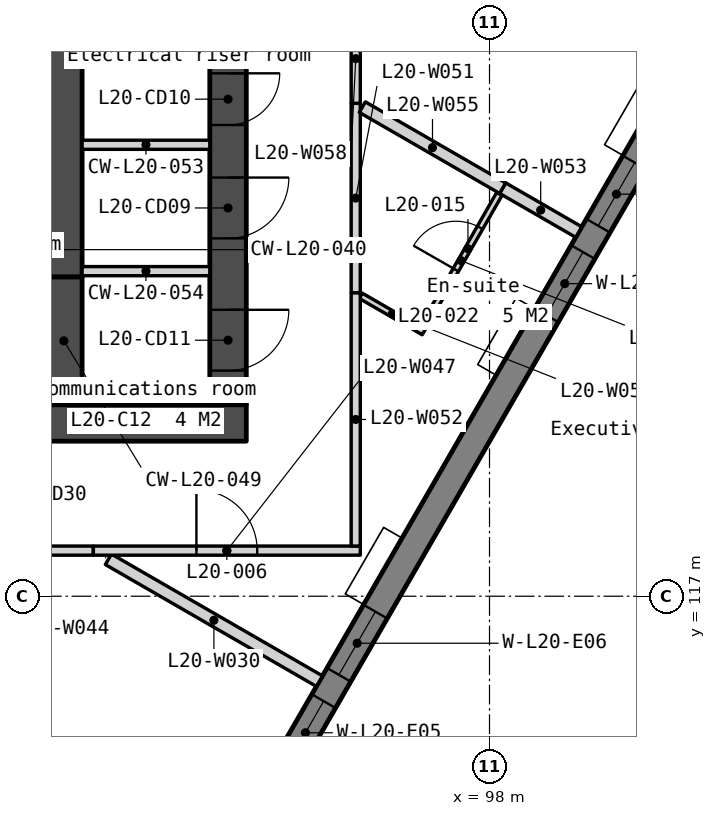
"""IFC4 building model, lengths in metres.
Left out: names, types, materials, properties, quantities, classifications, styles, units other than length and angle.
Written with IfcOpenShell. Run it as: python <this file> out.ifc"""

import sys

from ifc_helpers import new_model, si_unit, direction, frame, frame_2d, origin, place, context, subcontext, project, spatial, polyline, rectangle, outline, extrude, element, fill, save


model = new_model("IFC4")
c1 = context("Model", 3, precision=1e-05, world=origin(), true_north=direction((0.0, 1.0)))
c2 = subcontext(c1, "Body", "Model", "MODEL_VIEW")
j1 = project(units=[si_unit("LENGTHUNIT", "METRE"), si_unit("PLANEANGLEUNIT", "RADIAN")], contexts=[c1])
p1 = place(None, origin())
s1 = spatial("IfcSite", under=j1, at=p1, CompositionType="ELEMENT")
p2 = place(p1, origin())
s2 = spatial("IfcBuilding", under=s1, at=p2, CompositionType="ELEMENT")
p3 = place(p2, frame((0.0, 0.0, 85.3)))
s3 = spatial("IfcBuildingStorey", under=s2, at=p3, CompositionType="ELEMENT", Elevation=85.3)
p4 = place(p3, frame((66.0, 119.85, 0.0), z_axis=(0.0, 0.0, 1.0), x_axis=(1.0, 0.0, 0.0)))
e1 = element("IfcWall", 1, at=p4, inside=s3, PredefinedType="SOLIDWALL", context=c2, shape_type="SweptSolid", body=[
    extrude(rectangle(XDim=28.0, YDim=0.6, at=frame_2d((14.0, 0.0))), origin(), (0.0, 0.0, 1.0), 3.35),
])
p5 = place(p4, frame((6.825, 0.0, 0.0)))
e2 = element("IfcOpeningElement", 2, at=p5, cuts=e1, PredefinedType="OPENING", context=c2, shape_type="SweptSolid", body=[
    extrude(rectangle(XDim=1.8, YDim=2.1, at=frame_2d((0.9, 1.05))), frame((0.0, 0.31, 0.0), z_axis=(0.0, -1.0, 0.0), x_axis=(1.0, 0.0, 0.0)), (0.0, 0.0, 1.0), 0.62),
])
p6 = place(p4, frame((15.85, 0.0, 0.0)))
e3 = element("IfcOpeningElement", 3, at=p6, cuts=e1, PredefinedType="OPENING", context=c2, shape_type="SweptSolid", body=[
    extrude(rectangle(XDim=1.5, YDim=2.1, at=frame_2d((0.75, 1.05))), frame((0.0, 0.31, 0.0), z_axis=(0.0, -1.0, 0.0), x_axis=(1.0, 0.0, 0.0)), (0.0, 0.0, 1.0), 0.62),
])
p7 = place(p4, frame((19.375, 0.0, 0.0)))
e4 = element("IfcOpeningElement", 4, at=p7, cuts=e1, PredefinedType="OPENING", context=c2, shape_type="SweptSolid", body=[
    extrude(rectangle(XDim=1.8, YDim=2.1, at=frame_2d((0.9, 1.05))), frame((0.0, 0.31, 0.0), z_axis=(0.0, -1.0, 0.0), x_axis=(1.0, 0.0, 0.0)), (0.0, 0.0, 1.0), 0.62),
])
p8 = place(p4, frame((4.425, 0.0, 0.0)))
e5 = element("IfcOpeningElement", 5, at=p8, cuts=e1, PredefinedType="OPENING", context=c2, shape_type="SweptSolid", body=[
    extrude(rectangle(XDim=1.0, YDim=2.1, at=frame_2d((0.5, 1.05))), frame((0.0, 0.31, 0.0), z_axis=(0.0, -1.0, 0.0), x_axis=(1.0, 0.0, 0.0)), (0.0, 0.0, 1.0), 0.62),
])
p9 = place(p4, frame((9.783, 0.0, 0.0)))
e6 = element("IfcOpeningElement", 6, at=p9, cuts=e1, PredefinedType="OPENING", context=c2, shape_type="SweptSolid", body=[
    extrude(rectangle(XDim=1.0, YDim=2.1, at=frame_2d((0.5, 1.05))), frame((0.0, 0.31, 0.0), z_axis=(0.0, -1.0, 0.0), x_axis=(1.0, 0.0, 0.0)), (0.0, 0.0, 1.0), 0.62),
])
p10 = place(p4, frame((11.525, 0.0, 0.0)))
e7 = element("IfcOpeningElement", 7, at=p10, cuts=e1, PredefinedType="OPENING", context=c2, shape_type="SweptSolid", body=[
    extrude(rectangle(XDim=1.0, YDim=2.1, at=frame_2d((0.5, 1.05))), frame((0.0, 0.31, 0.0), z_axis=(0.0, -1.0, 0.0), x_axis=(1.0, 0.0, 0.0)), (0.0, 0.0, 1.0), 0.62),
])
p11 = place(p4, frame((13.658, 0.0, 0.0)))
e8 = element("IfcOpeningElement", 8, at=p11, cuts=e1, PredefinedType="OPENING", context=c2, shape_type="SweptSolid", body=[
    extrude(rectangle(XDim=1.0, YDim=2.1, at=frame_2d((0.5, 1.05))), frame((0.0, 0.31, 0.0), z_axis=(0.0, -1.0, 0.0), x_axis=(1.0, 0.0, 0.0)), (0.0, 0.0, 1.0), 0.62),
])
p12 = place(p4, frame((21.725, 0.0, 0.0)))
e9 = element("IfcOpeningElement", 9, at=p12, cuts=e1, PredefinedType="OPENING", context=c2, shape_type="SweptSolid", body=[
    extrude(rectangle(XDim=1.0, YDim=2.1, at=frame_2d((0.5, 1.05))), frame((0.0, 0.31, 0.0), z_axis=(0.0, -1.0, 0.0), x_axis=(1.0, 0.0, 0.0)), (0.0, 0.0, 1.0), 0.62),
])
p13 = place(p4, frame((23.425, 0.0, 0.0)))
e10 = element("IfcOpeningElement", 10, at=p13, cuts=e1, PredefinedType="OPENING", context=c2, shape_type="SweptSolid", body=[
    extrude(rectangle(XDim=1.0, YDim=2.1, at=frame_2d((0.5, 1.05))), frame((0.0, 0.31, 0.0), z_axis=(0.0, -1.0, 0.0), x_axis=(1.0, 0.0, 0.0)), (0.0, 0.0, 1.0), 0.62),
])
p14 = place(p3, frame((90.85, 133.95, 0.0), z_axis=(0.0, 0.0, 1.0), x_axis=(0.0, -1.0, 0.0)))
e11 = element("IfcWall", 11, at=p14, inside=s3, PredefinedType="SOLIDWALL", context=c2, shape_type="SweptSolid", body=[
    extrude(rectangle(XDim=11.7, YDim=0.9, at=frame_2d((5.85, 0.0))), origin(), (0.0, 0.0, 1.0), 3.35),
])
p15 = place(p3, frame((91.0, 122.25, 0.0), z_axis=(0.0, 0.0, 1.0), x_axis=(0.0, -1.0, 0.0)))
e12 = element("IfcWall", 12, at=p15, inside=s3, PredefinedType="SOLIDWALL", context=c2, shape_type="SweptSolid", body=[
    extrude(rectangle(XDim=2.1, YDim=0.6, at=frame_2d((1.05, 0.0))), origin(), (0.0, 0.0, 1.0), 3.35),
])
p16 = place(p3, frame((91.3, 126.15, 0.0), z_axis=(0.0, 0.0, 1.0), x_axis=(1.0, 0.0, 0.0)))
e13 = element("IfcWall", 13, at=p16, inside=s3, PredefinedType="SOLIDWALL", context=c2, shape_type="SweptSolid", body=[
    extrude(rectangle(XDim=2.1, YDim=0.6, at=frame_2d((1.05, 0.0))), origin(), (0.0, 0.0, 1.0), 3.35),
])
for number, where, z_axis, x_axis in (
    (14, (91.3, 124.425, 0.0), (0.0, 0.0, 1.0), (1.0, 0.0, 0.0)),
    (15, (91.3, 122.346, 0.0), (0.0, 0.0, 1.0), (1.0, 0.0, 0.0)),
):
    element("IfcWall", number, at=place(p3, frame(where, z_axis=z_axis, x_axis=x_axis)), inside=s3, PredefinedType="PARTITIONING", context=c2, shape_type="SweptSolid", body=[
        extrude(rectangle(XDim=2.1, YDim=0.15, at=frame_2d((1.05, 0.0))), origin(), (0.0, 0.0, 1.0), 3.35),
    ])
p17 = place(p3, frame((93.7, 133.95, 0.0), z_axis=(0.0, 0.0, 1.0), x_axis=(0.0, -1.0, 0.0)))
e16 = element("IfcWall", 16, at=p17, inside=s3, PredefinedType="SOLIDWALL", context=c2, shape_type="SweptSolid", body=[
    extrude(rectangle(XDim=13.8, YDim=0.6, at=frame_2d((6.9, 0.0))), origin(), (0.0, 0.0, 1.0), 3.35),
])
p18 = place(p17, frame((0.6, 0.0, 0.0)))
e17 = element("IfcOpeningElement", 17, at=p18, cuts=e16, PredefinedType="OPENING", context=c2, shape_type="SweptSolid", body=[
    extrude(rectangle(XDim=1.1, YDim=2.1, at=frame_2d((0.55, 1.05))), frame((0.0, 0.31, 0.0), z_axis=(0.0, -1.0, 0.0), x_axis=(1.0, 0.0, 0.0)), (0.0, 0.0, 1.0), 0.62),
])
p19 = place(p17, frame((10.064, 0.0, 0.0)))
e18 = element("IfcOpeningElement", 18, at=p19, cuts=e16, PredefinedType="OPENING", context=c2, shape_type="SweptSolid", body=[
    extrude(rectangle(XDim=1.0, YDim=2.1, at=frame_2d((0.5, 1.05))), frame((0.0, 0.31, 0.0), z_axis=(0.0, -1.0, 0.0), x_axis=(1.0, 0.0, 0.0)), (0.0, 0.0, 1.0), 0.62),
])
p20 = place(p17, frame((8.35, 0.0, 0.0)))
e19 = element("IfcOpeningElement", 19, at=p20, cuts=e16, PredefinedType="OPENING", context=c2, shape_type="SweptSolid", body=[
    extrude(rectangle(XDim=0.85, YDim=2.1, at=frame_2d((0.425, 1.05))), frame((0.0, 0.31, 0.0), z_axis=(0.0, -1.0, 0.0), x_axis=(1.0, 0.0, 0.0)), (0.0, 0.0, 1.0), 0.62),
])
p21 = place(p17, frame((12.239, 0.0, 0.0)))
e20 = element("IfcOpeningElement", 20, at=p21, cuts=e16, PredefinedType="OPENING", context=c2, shape_type="SweptSolid", body=[
    extrude(rectangle(XDim=1.0, YDim=2.1, at=frame_2d((0.5, 1.05))), frame((0.0, 0.31, 0.0), z_axis=(0.0, -1.0, 0.0), x_axis=(1.0, 0.0, 0.0)), (0.0, 0.0, 1.0), 0.62),
])
p22 = place(p3, frame((82.605, 93.333, -0.15), z_axis=(0.0, 0.0, 1.0), x_axis=(0.500000478905, 0.866025127289, 0.0)))
e21 = element("IfcWall", 21, at=p22, inside=s3, PredefinedType="SOLIDWALL", context=c2, shape_type="SweptSolid", body=[
    extrude(outline(polyline([(42.643, 0.0), (42.643, 3.5), (0.0, 3.5), (0.0, 0.0), (42.643, 0.0)])), frame((0.0, 0.225, 0.0), z_axis=(0.0, -1.0, 0.0), x_axis=(1.0, 0.0, 0.0)), (0.0, 0.0, 1.0), 0.45),
])
p23 = place(p22, frame((7.079, 0.0, 1.05)))
e22 = element("IfcOpeningElement", 22, at=p23, cuts=e21, PredefinedType="OPENING", context=c2, shape_type="SweptSolid", body=[
    extrude(rectangle(XDim=1.2, YDim=1.5, at=frame_2d((0.6, 0.75))), frame((0.0, 0.235, 0.0), z_axis=(0.0, -1.0, 0.0), x_axis=(1.0, 0.0, 0.0)), (0.0, 0.0, 1.0), 0.47),
])
p24 = place(p22, frame((8.779, 0.0, 1.05)))
e23 = element("IfcOpeningElement", 23, at=p24, cuts=e21, PredefinedType="OPENING", context=c2, shape_type="SweptSolid", body=[
    extrude(rectangle(XDim=1.2, YDim=1.5, at=frame_2d((0.6, 0.75))), frame((0.0, 0.235, 0.0), z_axis=(0.0, -1.0, 0.0), x_axis=(1.0, 0.0, 0.0)), (0.0, 0.0, 1.0), 0.47),
])
p25 = place(p22, frame((15.607, 0.0, 1.05)))
e24 = element("IfcOpeningElement", 24, at=p25, cuts=e21, PredefinedType="OPENING", context=c2, shape_type="SweptSolid", body=[
    extrude(rectangle(XDim=1.2, YDim=1.5, at=frame_2d((0.6, 0.75))), frame((0.0, 0.235, 0.0), z_axis=(0.0, -1.0, 0.0), x_axis=(1.0, 0.0, 0.0)), (0.0, 0.0, 1.0), 0.47),
])
p26 = place(p22, frame((17.307, 0.0, 1.05)))
e25 = element("IfcOpeningElement", 25, at=p26, cuts=e21, PredefinedType="OPENING", context=c2, shape_type="SweptSolid", body=[
    extrude(rectangle(XDim=1.2, YDim=1.5, at=frame_2d((0.6, 0.75))), frame((0.0, 0.235, 0.0), z_axis=(0.0, -1.0, 0.0), x_axis=(1.0, 0.0, 0.0)), (0.0, 0.0, 1.0), 0.47),
])
p27 = place(p22, frame((24.136, 0.0, 1.05)))
e26 = element("IfcOpeningElement", 26, at=p27, cuts=e21, PredefinedType="OPENING", context=c2, shape_type="SweptSolid", body=[
    extrude(rectangle(XDim=1.2, YDim=1.5, at=frame_2d((0.6, 0.75))), frame((0.0, 0.235, 0.0), z_axis=(0.0, -1.0, 0.0), x_axis=(1.0, 0.0, 0.0)), (0.0, 0.0, 1.0), 0.47),
])
p28 = place(p22, frame((25.836, 0.0, 1.05)))
e27 = element("IfcOpeningElement", 27, at=p28, cuts=e21, PredefinedType="OPENING", context=c2, shape_type="SweptSolid", body=[
    extrude(rectangle(XDim=1.2, YDim=1.5, at=frame_2d((0.6, 0.75))), frame((0.0, 0.235, 0.0), z_axis=(0.0, -1.0, 0.0), x_axis=(1.0, 0.0, 0.0)), (0.0, 0.0, 1.0), 0.47),
])
p29 = place(p22, frame((32.665, 0.0, 1.05)))
e28 = element("IfcOpeningElement", 28, at=p29, cuts=e21, PredefinedType="OPENING", context=c2, shape_type="SweptSolid", body=[
    extrude(rectangle(XDim=1.2, YDim=1.5, at=frame_2d((0.6, 0.75))), frame((0.0, 0.235, 0.0), z_axis=(0.0, -1.0, 0.0), x_axis=(1.0, 0.0, 0.0)), (0.0, 0.0, 1.0), 0.47),
])
p30 = place(p22, frame((34.365, 0.0, 1.05)))
e29 = element("IfcOpeningElement", 29, at=p30, cuts=e21, PredefinedType="OPENING", context=c2, shape_type="SweptSolid", body=[
    extrude(rectangle(XDim=1.2, YDim=1.5, at=frame_2d((0.6, 0.75))), frame((0.0, 0.235, 0.0), z_axis=(0.0, -1.0, 0.0), x_axis=(1.0, 0.0, 0.0)), (0.0, 0.0, 1.0), 0.47),
])
p31 = place(p3, frame((86.087, 115.943, 0.0), z_axis=(0.0, 0.0, 1.0), x_axis=(0.866010152247, -0.500026415507, 0.0)))
e30 = element("IfcWall", 30, at=p31, inside=s3, PredefinedType="PARTITIONING", context=c2, shape_type="SweptSolid", body=[
    extrude(rectangle(XDim=8.065, YDim=0.2, at=frame_2d((4.032, 0.0))), origin(), (0.0, 0.0, 1.0), 3.35),
])
p32 = place(p3, frame((91.732, 117.607, 0.0), z_axis=(0.0, 0.0, 1.0), x_axis=(0.866034462328, -0.499984309814, 0.0)))
e31 = element("IfcWall", 31, at=p32, inside=s3, PredefinedType="PARTITIONING", context=c2, shape_type="SweptSolid", body=[
    extrude(rectangle(XDim=4.009, YDim=0.2, at=frame_2d((2.004, 0.0))), origin(), (0.0, 0.0, 1.0), 3.35),
])
p33 = place(p3, frame((87.756, 117.75, 0.0), z_axis=(0.0, 0.0, 1.0), x_axis=(1.0, 0.0, 0.0)))
e32 = element("IfcWall", 32, at=p33, inside=s3, PredefinedType="PARTITIONING", context=c2, shape_type="SweptSolid", body=[
    extrude(rectangle(XDim=3.729, YDim=0.15, at=frame_2d((1.864, 0.0))), origin(), (0.0, 0.0, 1.0), 3.35),
])
p34 = place(p33, frame((1.414, 0.0, 0.0)))
e33 = element("IfcOpeningElement", 33, at=p34, cuts=e32, PredefinedType="OPENING", context=c2, shape_type="SweptSolid", body=[
    extrude(rectangle(XDim=0.9, YDim=2.1, at=frame_2d((0.45, 1.05))), frame((0.0, 0.085, 0.0), z_axis=(0.0, -1.0, 0.0), x_axis=(1.0, 0.0, 0.0)), (0.0, 0.0, 1.0), 0.17),
])
p35 = place(p3, frame((91.485, 117.75, 0.0), z_axis=(0.0, 0.0, 1.0), x_axis=(1.0, 0.0, 0.0)))
e34 = element("IfcWall", 34, at=p35, inside=s3, PredefinedType="PARTITIONING", context=c2, shape_type="SweptSolid", body=[
    extrude(rectangle(XDim=4.39, YDim=0.15, at=frame_2d((2.195, 0.0))), origin(), (0.0, 0.0, 1.0), 3.35),
])
p36 = place(p35, frame((1.695, 0.0, 0.0)))
e35 = element("IfcOpeningElement", 35, at=p36, cuts=e34, PredefinedType="OPENING", context=c2, shape_type="SweptSolid", body=[
    extrude(rectangle(XDim=1.0, YDim=2.1, at=frame_2d((0.5, 1.05))), frame((0.0, 0.085, 0.0), z_axis=(0.0, -1.0, 0.0), x_axis=(1.0, 0.0, 0.0)), (0.0, 0.0, 1.0), 0.17),
])
p37 = place(p3, frame((95.882, 121.941, 0.0), z_axis=(0.0, 0.0, 1.0), x_axis=(0.866087020037, -0.499893262331, 0.0)))
e36 = element("IfcWall", 36, at=p37, inside=s3, PredefinedType="PARTITIONING", context=c2, shape_type="SweptSolid", body=[
    extrude(rectangle(XDim=1.196, YDim=0.1, at=frame_2d((0.598, 0.0))), origin(), (0.0, 0.0, 1.0), 3.35),
])
p38 = place(p3, frame((95.8, 121.989, 0.0), z_axis=(0.0, 0.0, 1.0), x_axis=(0.0, 1.0, 0.0)))
e37 = element("IfcWall", 37, at=p38, inside=s3, PredefinedType="PARTITIONING", context=c2, shape_type="SweptSolid", body=[
    extrude(rectangle(XDim=3.118, YDim=0.15, at=frame_2d((1.559, 0.0))), origin(), (0.0, 0.0, 1.0), 3.35),
])
p39 = place(p3, frame((95.8, 117.825, 0.0), z_axis=(0.0, 0.0, 1.0), x_axis=(0.0, 1.0, 0.0)))
e38 = element("IfcWall", 38, at=p39, inside=s3, PredefinedType="PARTITIONING", context=c2, shape_type="SweptSolid", body=[
    extrude(rectangle(XDim=4.164, YDim=0.15, at=frame_2d((2.082, 0.0))), origin(), (0.0, 0.0, 1.0), 3.35),
])
p40 = place(p3, frame((98.216, 123.712, 0.0), z_axis=(0.0, 0.0, 1.0), x_axis=(0.866019559589, -0.500010122307, 0.0)))
e39 = element("IfcWall", 39, at=p40, inside=s3, PredefinedType="PARTITIONING", context=c2, shape_type="SweptSolid", body=[
    extrude(rectangle(XDim=1.445, YDim=0.2, at=frame_2d((0.722, 0.0))), origin(), (0.0, 0.0, 1.0), 3.35),
])
p41 = place(p3, frame((96.905, 121.42, 0.0), z_axis=(0.0, 0.0, 1.0), x_axis=(0.496762324189, 0.867886624661, 0.0)))
e40 = element("IfcWall", 40, at=p41, inside=s3, PredefinedType="PARTITIONING", context=c2, shape_type="SweptSolid", body=[
    extrude(rectangle(XDim=2.53, YDim=0.1, at=frame_2d((1.265, 0.0))), origin(), (0.0, 0.0, 1.0), 3.35),
])
p42 = place(p41, frame((1.091, 0.0, 0.0)))
e41 = element("IfcOpeningElement", 41, at=p42, cuts=e40, PredefinedType="OPENING", context=c2, shape_type="SweptSolid", body=[
    extrude(rectangle(XDim=0.8, YDim=2.1, at=frame_2d((0.4, 1.05))), frame((0.0, 0.06, 0.0), z_axis=(0.0, -1.0, 0.0), x_axis=(1.0, 0.0, 0.0)), (0.0, 0.0, 1.0), 0.12),
])
p43 = place(p3, frame((95.908, 125.044, 0.0), z_axis=(0.0, 0.0, 1.0), x_axis=(0.866036091453, -0.499981487958, 0.0)))
e42 = element("IfcWall", 42, at=p43, inside=s3, PredefinedType="PARTITIONING", context=c2, shape_type="SweptSolid", body=[
    extrude(rectangle(XDim=2.665, YDim=0.2, at=frame_2d((1.333, 0.0))), origin(), (0.0, 0.0, 1.0), 3.35),
])
p44 = place(p3, frame((95.8, 125.107, 0.0), z_axis=(0.0, 0.0, 1.0), x_axis=(0.0, 1.0, 0.0)))
e43 = element("IfcWall", 43, at=p44, inside=s3, PredefinedType="PARTITIONING", context=c2, shape_type="SweptSolid", body=[
    extrude(rectangle(XDim=1.468, YDim=0.15, at=frame_2d((0.734, 0.0))), origin(), (0.0, 0.0, 1.0), 3.35),
])
p45 = place(p19, origin())
e44 = element("IfcDoor", 44, at=p45, inside=s3, OperationType="SINGLE_SWING_LEFT", PredefinedType="DOOR", context=c2, shape_type="SweptSolid", body=[
    extrude(rectangle(XDim=1.0, YDim=2.1, at=frame_2d((0.5, 1.05))), frame((0.0, 0.025, 0.0), z_axis=(0.0, -1.0, 0.0), x_axis=(1.0, 0.0, 0.0)), (0.0, 0.0, 1.0), 0.05),
])
fill(e18, e44)
p46 = place(p20, origin())
e45 = element("IfcDoor", 45, at=p46, inside=s3, OperationType="SINGLE_SWING_LEFT", PredefinedType="DOOR", context=c2, shape_type="SweptSolid", body=[
    extrude(rectangle(XDim=0.85, YDim=2.1, at=frame_2d((0.425, 1.05))), frame((0.0, 0.025, 0.0), z_axis=(0.0, -1.0, 0.0), x_axis=(1.0, 0.0, 0.0)), (0.0, 0.0, 1.0), 0.05),
])
fill(e19, e45)
p47 = place(p21, origin())
e46 = element("IfcDoor", 46, at=p47, inside=s3, OperationType="SINGLE_SWING_LEFT", PredefinedType="DOOR", context=c2, shape_type="SweptSolid", body=[
    extrude(rectangle(XDim=1.0, YDim=2.1, at=frame_2d((0.5, 1.05))), frame((0.0, 0.025, 0.0), z_axis=(0.0, -1.0, 0.0), x_axis=(1.0, 0.0, 0.0)), (0.0, 0.0, 1.0), 0.05),
])
fill(e20, e46)
p48 = place(p27, origin())
e47 = element("IfcWindow", 47, at=p48, inside=s3, PartitioningType="SINGLE_PANEL", PredefinedType="WINDOW", context=c2, shape_type="SweptSolid", body=[
    extrude(rectangle(XDim=1.2, YDim=1.5, at=frame_2d((0.6, 0.75))), frame((0.0, 0.03, 0.0), z_axis=(0.0, -1.0, 0.0), x_axis=(1.0, 0.0, 0.0)), (0.0, 0.0, 1.0), 0.06),
])
fill(e26, e47)
p49 = place(p28, origin())
e48 = element("IfcWindow", 48, at=p49, inside=s3, PartitioningType="SINGLE_PANEL", PredefinedType="WINDOW", context=c2, shape_type="SweptSolid", body=[
    extrude(rectangle(XDim=1.2, YDim=1.5, at=frame_2d((0.6, 0.75))), frame((0.0, 0.03, 0.0), z_axis=(0.0, -1.0, 0.0), x_axis=(1.0, 0.0, 0.0)), (0.0, 0.0, 1.0), 0.06),
])
fill(e27, e48)
p50 = place(p29, origin())
e49 = element("IfcWindow", 49, at=p50, inside=s3, PartitioningType="SINGLE_PANEL", PredefinedType="WINDOW", context=c2, shape_type="SweptSolid", body=[
    extrude(rectangle(XDim=1.2, YDim=1.5, at=frame_2d((0.6, 0.75))), frame((0.0, 0.03, 0.0), z_axis=(0.0, -1.0, 0.0), x_axis=(1.0, 0.0, 0.0)), (0.0, 0.0, 1.0), 0.06),
])
fill(e28, e49)
p51 = place(p30, origin())
e50 = element("IfcWindow", 50, at=p51, inside=s3, PartitioningType="SINGLE_PANEL", PredefinedType="WINDOW", context=c2, shape_type="SweptSolid", body=[
    extrude(rectangle(XDim=1.2, YDim=1.5, at=frame_2d((0.6, 0.75))), frame((0.0, 0.03, 0.0), z_axis=(0.0, -1.0, 0.0), x_axis=(1.0, 0.0, 0.0)), (0.0, 0.0, 1.0), 0.06),
])
fill(e29, e50)
p52 = place(p36, origin())
e51 = element("IfcDoor", 51, at=p52, inside=s3, OperationType="SINGLE_SWING_LEFT", PredefinedType="DOOR", context=c2, shape_type="SweptSolid", body=[
    extrude(rectangle(XDim=1.0, YDim=2.1, at=frame_2d((0.5, 1.05))), frame((0.0, 0.025, 0.0), z_axis=(0.0, -1.0, 0.0), x_axis=(1.0, 0.0, 0.0)), (0.0, 0.0, 1.0), 0.05),
])
fill(e35, e51)
p53 = place(p42, origin())
e52 = element("IfcDoor", 52, at=p53, inside=s3, OperationType="SINGLE_SWING_LEFT", PredefinedType="DOOR", context=c2, shape_type="SweptSolid", body=[
    extrude(rectangle(XDim=0.8, YDim=2.1, at=frame_2d((0.4, 1.05))), frame((0.0, 0.025, 0.0), z_axis=(0.0, -1.0, 0.0), x_axis=(1.0, 0.0, 0.0)), (0.0, 0.0, 1.0), 0.05),
])
fill(e41, e52)
save(model, sys.argv[1])
